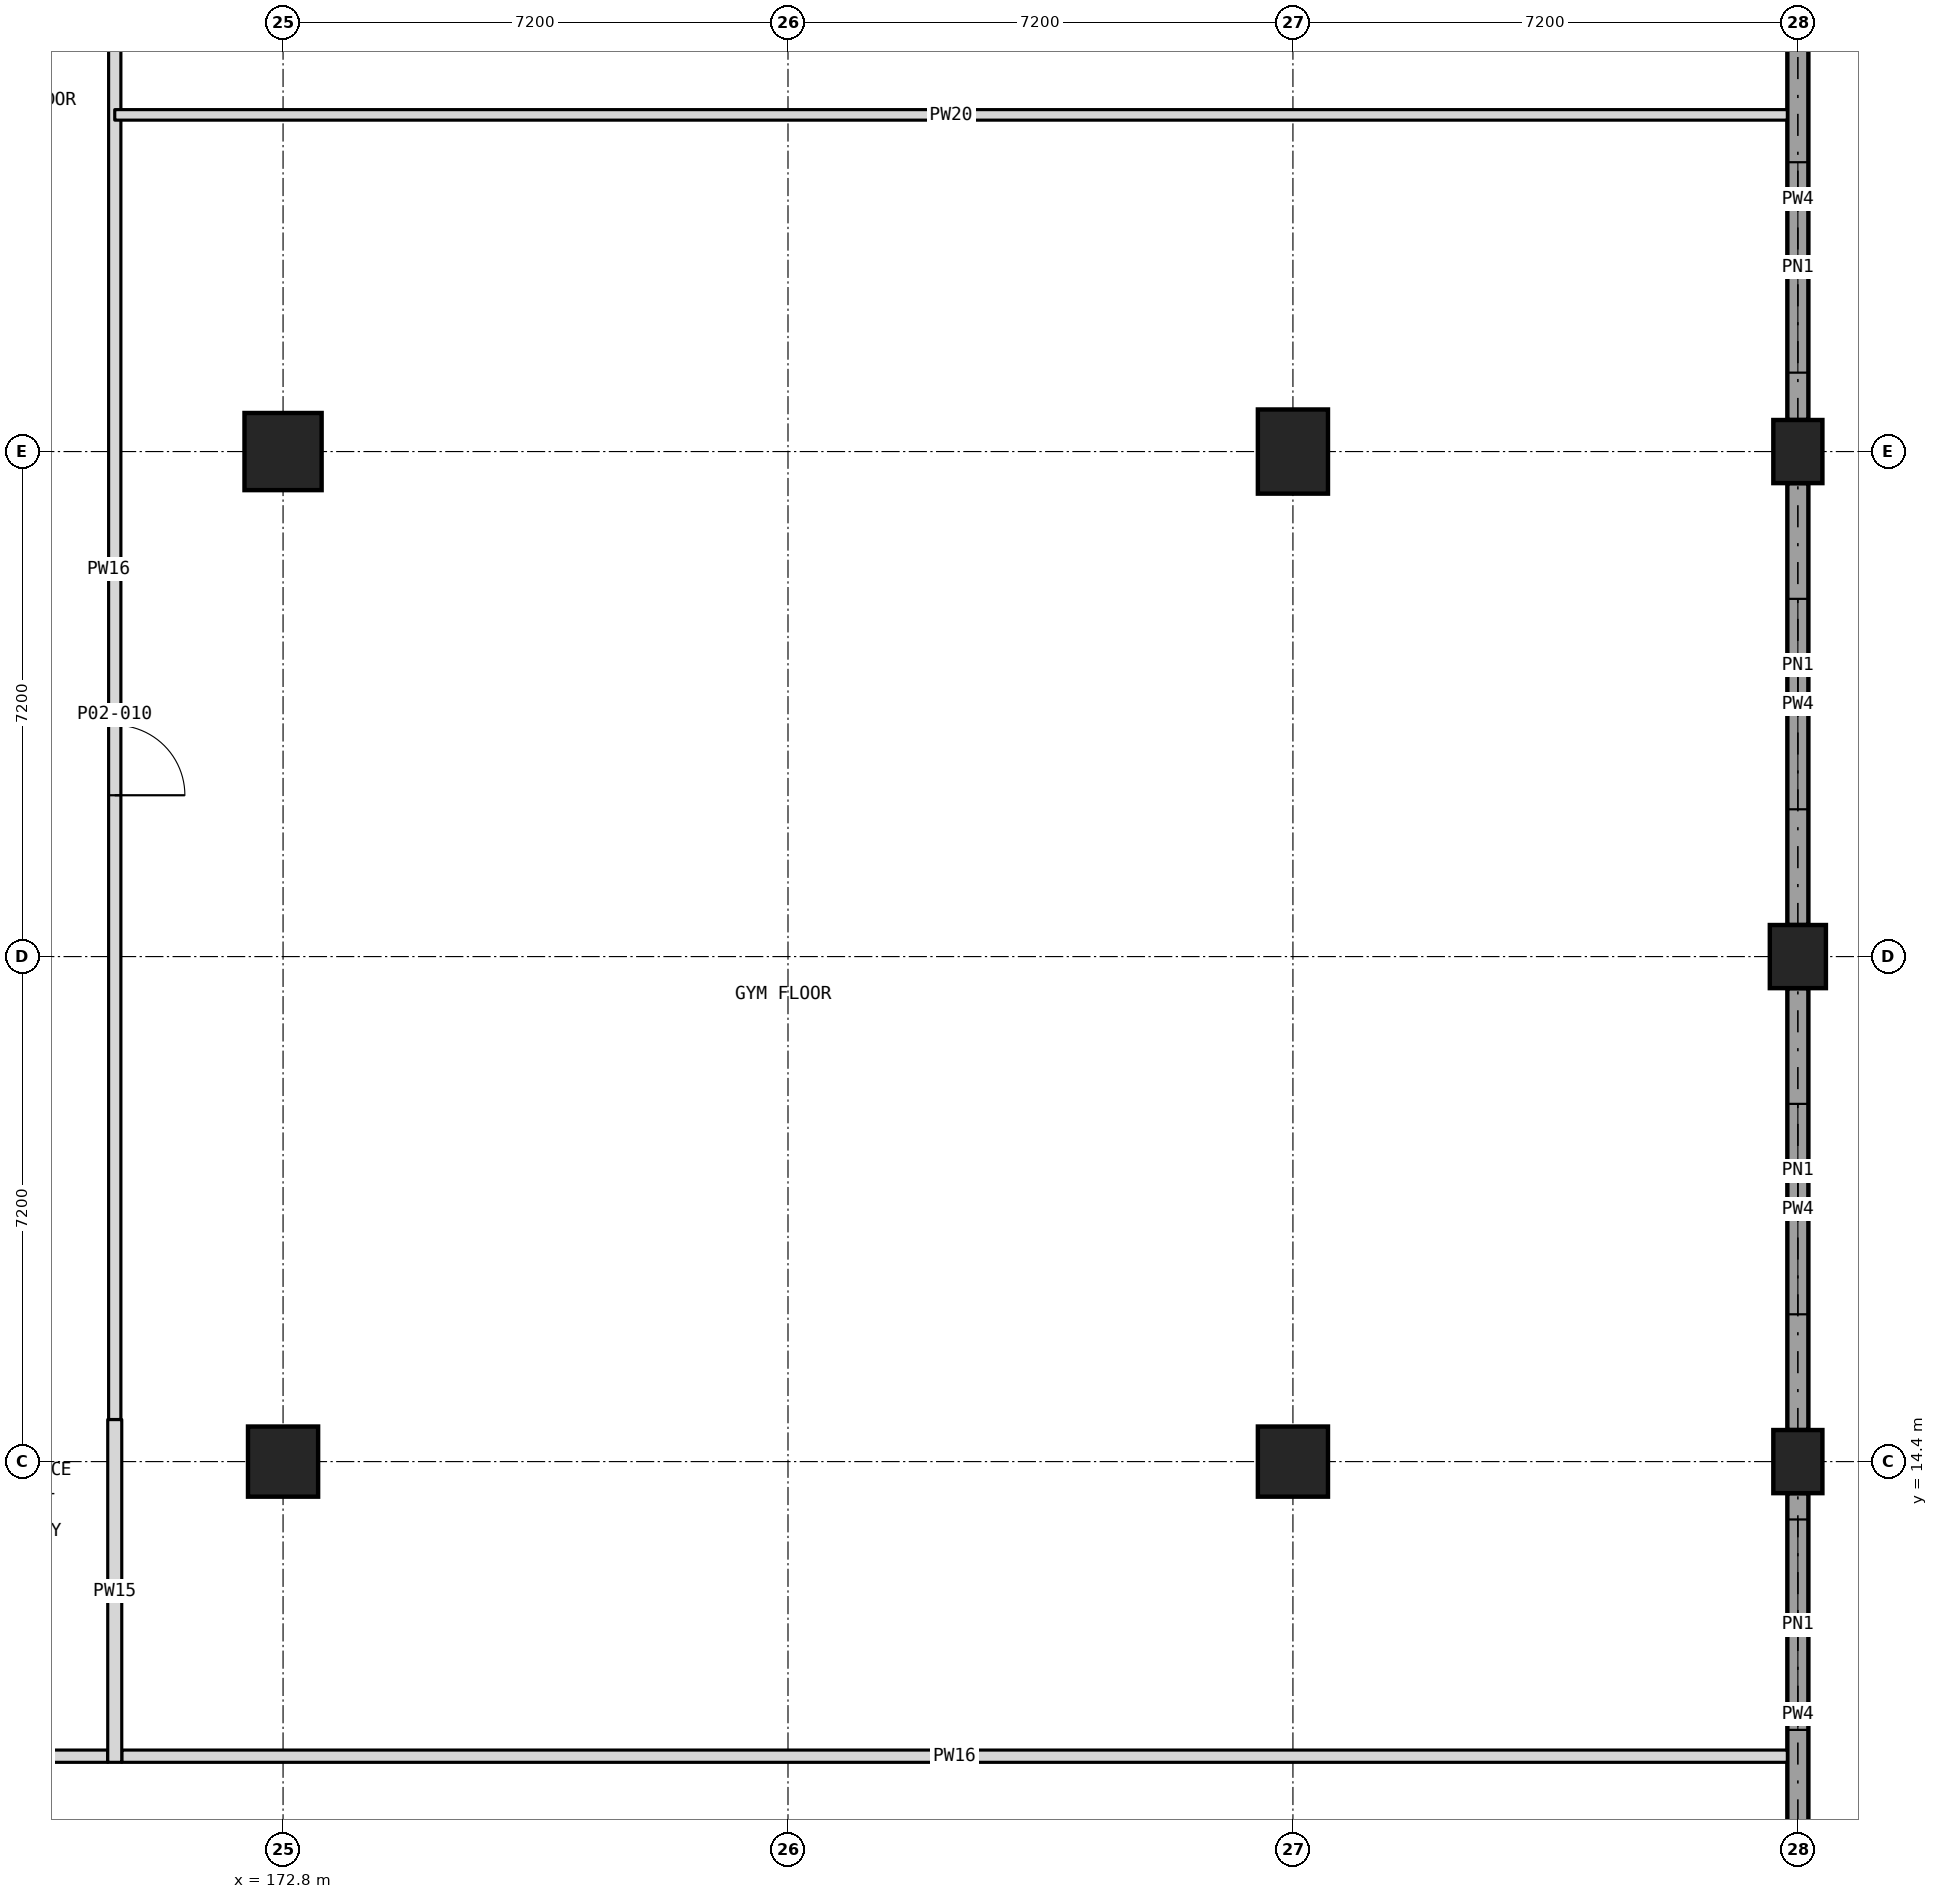
"""IFC4 building model, lengths in metres.
Left out: names, types, materials, properties, quantities, classifications, styles, units other than length and angle.
Written with IfcOpenShell. Run it as: python <this file> out.ifc"""

import sys

from ifc_helpers import new_model, si_unit, direction, frame, frame_2d, origin, origin_2d, place, context, subcontext, project, spatial, rectangle, extrude, element, fill, save


model = new_model("IFC4")
c1 = context("Model", 3, precision=1e-05, world=origin(), true_north=direction((0.0, 1.0)))
c2 = subcontext(c1, "Body", "Model", "MODEL_VIEW")
j1 = project(units=[si_unit("LENGTHUNIT", "METRE"), si_unit("PLANEANGLEUNIT", "RADIAN")], contexts=[c1])
p1 = place(None, origin())
s1 = spatial("IfcSite", under=j1, at=p1, CompositionType="ELEMENT")
p2 = place(p1, origin())
s2 = spatial("IfcBuilding", under=s1, at=p2, CompositionType="ELEMENT")
p3 = place(p2, frame((0.0, 0.0, 12.0)))
s3 = spatial("IfcBuildingStorey", under=s2, at=p3, CompositionType="ELEMENT", Elevation=12.0)
p4 = place(p3, frame((172.8, 14.4, 0.0), z_axis=(0.0, 0.0, 1.0), x_axis=(1.0, 0.0, 0.0)))
e1 = element("IfcColumn", 1, at=p4, inside=s3, PredefinedType="COLUMN", context=c2, shape_type="SweptSolid", body=[
    extrude(rectangle(XDim=1.0, YDim=1.0, at=origin_2d()), origin(), (0.0, 0.0, 1.0), 4.5),
])
p5 = place(p3, frame((172.8, 28.8, -0.5), z_axis=(0.0, 0.0, 1.0), x_axis=(1.0, 0.0, 0.0)))
e2 = element("IfcColumn", 2, at=p5, inside=s3, PredefinedType="COLUMN", context=c2, shape_type="SweptSolid", body=[
    extrude(rectangle(XDim=1.1, YDim=1.1, at=origin_2d()), origin(), (0.0, 0.0, 1.0), 5.0),
])
p6 = place(p3, frame((187.2, 14.4, 0.0), z_axis=(0.0, 0.0, 1.0), x_axis=(1.0, 0.0, 0.0)))
e3 = element("IfcColumn", 3, at=p6, inside=s3, PredefinedType="COLUMN", context=c2, shape_type="SweptSolid", body=[
    extrude(rectangle(XDim=1.0, YDim=1.0, at=origin_2d()), origin(), (0.0, 0.0, 1.0), 4.5),
])
p7 = place(p3, frame((187.2, 28.8, 0.0), z_axis=(0.0, 0.0, 1.0), x_axis=(1.0, 0.0, 0.0)))
e4 = element("IfcColumn", 4, at=p7, inside=s3, PredefinedType="COLUMN", context=c2, shape_type="SweptSolid", body=[
    extrude(rectangle(XDim=1.0, YDim=1.2, at=origin_2d()), origin(), (0.0, 0.0, 1.0), 4.5),
])
p8 = place(p3, frame((194.4, 14.4, 0.0), z_axis=(0.0, 0.0, 1.0), x_axis=(1.0, 0.0, 0.0)))
e5 = element("IfcColumn", 5, at=p8, inside=s3, PredefinedType="COLUMN", context=c2, shape_type="SweptSolid", body=[
    extrude(rectangle(XDim=0.7, YDim=0.9, at=origin_2d()), origin(), (0.0, 0.0, 1.0), 4.5),
])
p9 = place(p3, frame((194.4, 21.6, 0.0), z_axis=(0.0, 0.0, 1.0), x_axis=(1.0, 0.0, 0.0)))
e6 = element("IfcColumn", 6, at=p9, inside=s3, PredefinedType="COLUMN", context=c2, shape_type="SweptSolid", body=[
    extrude(rectangle(XDim=0.8, YDim=0.9, at=origin_2d()), origin(), (0.0, 0.0, 1.0), 4.5),
])
p10 = place(p3, frame((194.4, 28.8, 0.0), z_axis=(0.0, 0.0, 1.0), x_axis=(1.0, 0.0, 0.0)))
e7 = element("IfcColumn", 7, at=p10, inside=s3, PredefinedType="COLUMN", context=c2, shape_type="SweptSolid", body=[
    extrude(rectangle(XDim=0.7, YDim=0.9, at=origin_2d()), origin(), (0.0, 0.0, 1.0), 4.5),
])
p11 = place(p3, frame((194.4, 7.65, 0.0), z_axis=(0.0, 0.0, 1.0), x_axis=(0.0, 1.0, 0.0)))
e8 = element("IfcWall", 8, at=p11, inside=s3, PredefinedType="SOLIDWALL", context=c2, shape_type="SweptSolid", body=[
    extrude(rectangle(XDim=6.3, YDim=0.3, at=frame_2d((3.15, 0.0))), origin(), (0.0, 0.0, 1.0), 3.6),
])
p12 = place(p11, frame((2.925, 0.0, 0.9)))
e9 = element("IfcOpeningElement", 9, at=p12, cuts=e8, PredefinedType="OPENING", context=c2, shape_type="SweptSolid", body=[
    extrude(rectangle(XDim=3.0, YDim=2.4, at=frame_2d((1.5, 1.2))), frame((0.0, 0.16, 0.0), z_axis=(0.0, -1.0, 0.0), x_axis=(1.0, 0.0, 0.0)), (0.0, 0.0, 1.0), 0.32),
])
p13 = place(p3, frame((194.4, 14.85, 0.0), z_axis=(0.0, 0.0, 1.0), x_axis=(0.0, 1.0, 0.0)))
e10 = element("IfcWall", 10, at=p13, inside=s3, PredefinedType="SOLIDWALL", context=c2, shape_type="SweptSolid", body=[
    extrude(rectangle(XDim=6.3, YDim=0.3, at=frame_2d((3.15, 0.0))), origin(), (0.0, 0.0, 1.0), 3.6),
])
p14 = place(p13, frame((1.65, 0.0, 0.9)))
e11 = element("IfcOpeningElement", 11, at=p14, cuts=e10, PredefinedType="OPENING", context=c2, shape_type="SweptSolid", body=[
    extrude(rectangle(XDim=3.0, YDim=2.4, at=frame_2d((1.5, 1.2))), frame((0.0, 0.16, 0.0), z_axis=(0.0, -1.0, 0.0), x_axis=(1.0, 0.0, 0.0)), (0.0, 0.0, 1.0), 0.32),
])
p15 = place(p3, frame((194.4, 22.05, 0.0), z_axis=(0.0, 0.0, 1.0), x_axis=(0.0, 1.0, 0.0)))
e12 = element("IfcWall", 12, at=p15, inside=s3, PredefinedType="SOLIDWALL", context=c2, shape_type="SweptSolid", body=[
    extrude(rectangle(XDim=6.3, YDim=0.3, at=frame_2d((3.15, 0.0))), origin(), (0.0, 0.0, 1.0), 3.6),
])
p16 = place(p15, frame((1.65, 0.0, 0.9)))
e13 = element("IfcOpeningElement", 13, at=p16, cuts=e12, PredefinedType="OPENING", context=c2, shape_type="SweptSolid", body=[
    extrude(rectangle(XDim=3.0, YDim=2.4, at=frame_2d((1.5, 1.2))), frame((0.0, 0.16, 0.0), z_axis=(0.0, -1.0, 0.0), x_axis=(1.0, 0.0, 0.0)), (0.0, 0.0, 1.0), 0.32),
])
p17 = place(p3, frame((194.4, 29.25, 0.0), z_axis=(0.0, 0.0, 1.0), x_axis=(0.0, 1.0, 0.0)))
e14 = element("IfcWall", 14, at=p17, inside=s3, PredefinedType="SOLIDWALL", context=c2, shape_type="SweptSolid", body=[
    extrude(rectangle(XDim=6.3, YDim=0.3, at=frame_2d((3.15, 0.0))), origin(), (0.0, 0.0, 1.0), 3.6),
])
p18 = place(p17, frame((0.675, 0.0, 0.9)))
e15 = element("IfcOpeningElement", 15, at=p18, cuts=e14, PredefinedType="OPENING", context=c2, shape_type="SweptSolid", body=[
    extrude(rectangle(XDim=3.0, YDim=2.4, at=frame_2d((1.5, 1.2))), frame((0.0, 0.16, 0.0), z_axis=(0.0, -1.0, 0.0), x_axis=(1.0, 0.0, 0.0)), (0.0, 0.0, 1.0), 0.32),
])
p19 = place(p3, frame((168.1, 10.2, 0.0), z_axis=(0.0, 0.0, 1.0), x_axis=(1.0, 0.0, 0.0)))
e16 = element("IfcWall", 16, at=p19, inside=s3, PredefinedType="PARTITIONING", context=c2, shape_type="SweptSolid", body=[
    extrude(rectangle(XDim=2.2, YDim=0.175, at=frame_2d((1.1, 0.0))), origin(), (0.0, 0.0, 1.0), 4.0),
])
p20 = place(p3, frame((170.5, 10.2, 0.0), z_axis=(0.0, 0.0, 1.0), x_axis=(1.0, 0.0, 0.0)))
e17 = element("IfcWall", 17, at=p20, inside=s3, PredefinedType="PARTITIONING", context=c2, shape_type="SweptSolid", body=[
    extrude(rectangle(XDim=23.75, YDim=0.175, at=frame_2d((11.875, 0.0))), origin(), (0.0, 0.0, 1.0), 4.0),
])
p21 = place(p3, frame((170.4, 10.113, 0.0), z_axis=(0.0, 0.0, 1.0), x_axis=(0.0, 1.0, 0.0)))
e18 = element("IfcWall", 18, at=p21, inside=s3, PredefinedType="PARTITIONING", context=c2, shape_type="SweptSolid", body=[
    extrude(rectangle(XDim=4.887, YDim=0.2, at=frame_2d((2.444, 0.0))), origin(), (0.0, 0.0, 1.0), 4.0),
])
p22 = place(p3, frame((170.4, 15.0, 0.0), z_axis=(0.0, 0.0, 1.0), x_axis=(0.0, 1.0, 0.0)))
e19 = element("IfcWall", 19, at=p22, inside=s3, PredefinedType="PARTITIONING", context=c2, shape_type="SweptSolid", body=[
    extrude(rectangle(XDim=61.712, YDim=0.175, at=frame_2d((30.856, 0.0))), origin(), (0.0, 0.0, 1.0), 4.0),
])
p23 = place(p22, frame((8.9, 0.0, 0.0)))
e20 = element("IfcOpeningElement", 20, at=p23, cuts=e19, PredefinedType="OPENING", context=c2, shape_type="SweptSolid", body=[
    extrude(rectangle(XDim=1.0, YDim=2.1, at=frame_2d((0.5, 1.05))), frame((0.0, 0.097, 0.0), z_axis=(0.0, -1.0, 0.0), x_axis=(1.0, 0.0, 0.0)), (0.0, 0.0, 1.0), 0.195),
])
p24 = place(p22, frame((30.1, 0.0, 0.0)))
e21 = element("IfcOpeningElement", 21, at=p24, cuts=e19, PredefinedType="OPENING", context=c2, shape_type="SweptSolid", body=[
    extrude(rectangle(XDim=1.0, YDim=2.1, at=frame_2d((0.5, 1.05))), frame((0.0, 0.097, 0.0), z_axis=(0.0, -1.0, 0.0), x_axis=(1.0, 0.0, 0.0)), (0.0, 0.0, 1.0), 0.195),
])
p25 = place(p22, frame((51.751, 0.0, 0.0)))
e22 = element("IfcOpeningElement", 22, at=p25, cuts=e19, PredefinedType="OPENING", context=c2, shape_type="SweptSolid", body=[
    extrude(rectangle(XDim=1.1, YDim=2.4, at=frame_2d((0.55, 1.2))), frame((0.0, 0.097, 0.0), z_axis=(0.0, -1.0, 0.0), x_axis=(1.0, 0.0, 0.0)), (0.0, 0.0, 1.0), 0.195),
])
p26 = place(p3, frame((170.4, 33.6, 0.0), z_axis=(0.0, 0.0, 1.0), x_axis=(1.0, 0.0, 0.0)))
e23 = element("IfcWall", 23, at=p26, inside=s3, PredefinedType="PARTITIONING", context=c2, shape_type="SweptSolid", body=[
    extrude(rectangle(XDim=23.85, YDim=0.15, at=frame_2d((11.925, 0.0))), origin(), (0.0, 0.0, 1.0), 4.0),
])
p27 = place(p12, origin())
e24 = element("IfcWindow", 24, at=p27, inside=s3, PartitioningType="DOUBLE_PANEL_VERTICAL", PredefinedType="WINDOW", context=c2, shape_type="SweptSolid", body=[
    extrude(rectangle(XDim=3.0, YDim=2.4, at=frame_2d((1.5, 1.2))), frame((0.0, 0.12, 0.0), z_axis=(0.0, -1.0, 0.0), x_axis=(1.0, 0.0, 0.0)), (0.0, 0.0, 1.0), 0.06),
])
fill(e9, e24)
p28 = place(p14, origin())
e25 = element("IfcWindow", 25, at=p28, inside=s3, PartitioningType="DOUBLE_PANEL_VERTICAL", PredefinedType="WINDOW", context=c2, shape_type="SweptSolid", body=[
    extrude(rectangle(XDim=3.0, YDim=2.4, at=frame_2d((1.5, 1.2))), frame((0.0, 0.12, 0.0), z_axis=(0.0, -1.0, 0.0), x_axis=(1.0, 0.0, 0.0)), (0.0, 0.0, 1.0), 0.06),
])
fill(e11, e25)
p29 = place(p16, origin())
e26 = element("IfcWindow", 26, at=p29, inside=s3, PartitioningType="DOUBLE_PANEL_VERTICAL", PredefinedType="WINDOW", context=c2, shape_type="SweptSolid", body=[
    extrude(rectangle(XDim=3.0, YDim=2.4, at=frame_2d((1.5, 1.2))), frame((0.0, 0.12, 0.0), z_axis=(0.0, -1.0, 0.0), x_axis=(1.0, 0.0, 0.0)), (0.0, 0.0, 1.0), 0.06),
])
fill(e13, e26)
p30 = place(p18, origin())
e27 = element("IfcWindow", 27, at=p30, inside=s3, PartitioningType="DOUBLE_PANEL_VERTICAL", PredefinedType="WINDOW", context=c2, shape_type="SweptSolid", body=[
    extrude(rectangle(XDim=3.0, YDim=2.4, at=frame_2d((1.5, 1.2))), frame((0.0, 0.12, 0.0), z_axis=(0.0, -1.0, 0.0), x_axis=(1.0, 0.0, 0.0)), (0.0, 0.0, 1.0), 0.06),
])
fill(e15, e27)
p31 = place(p23, frame((1.0, 0.0, 0.0), z_axis=(0.0, 0.0, 1.0), x_axis=(-1.0, 0.0, 0.0)))
e28 = element("IfcDoor", 28, at=p31, inside=s3, OperationType="SINGLE_SWING_RIGHT", PredefinedType="DOOR", context=c2, shape_type="SweptSolid", body=[
    extrude(rectangle(XDim=1.0, YDim=2.1, at=frame_2d((0.5, 1.05))), frame((0.0, 0.025, 0.0), z_axis=(0.0, -1.0, 0.0), x_axis=(1.0, 0.0, 0.0)), (0.0, 0.0, 1.0), 0.05),
])
fill(e20, e28)
save(model, sys.argv[1])
